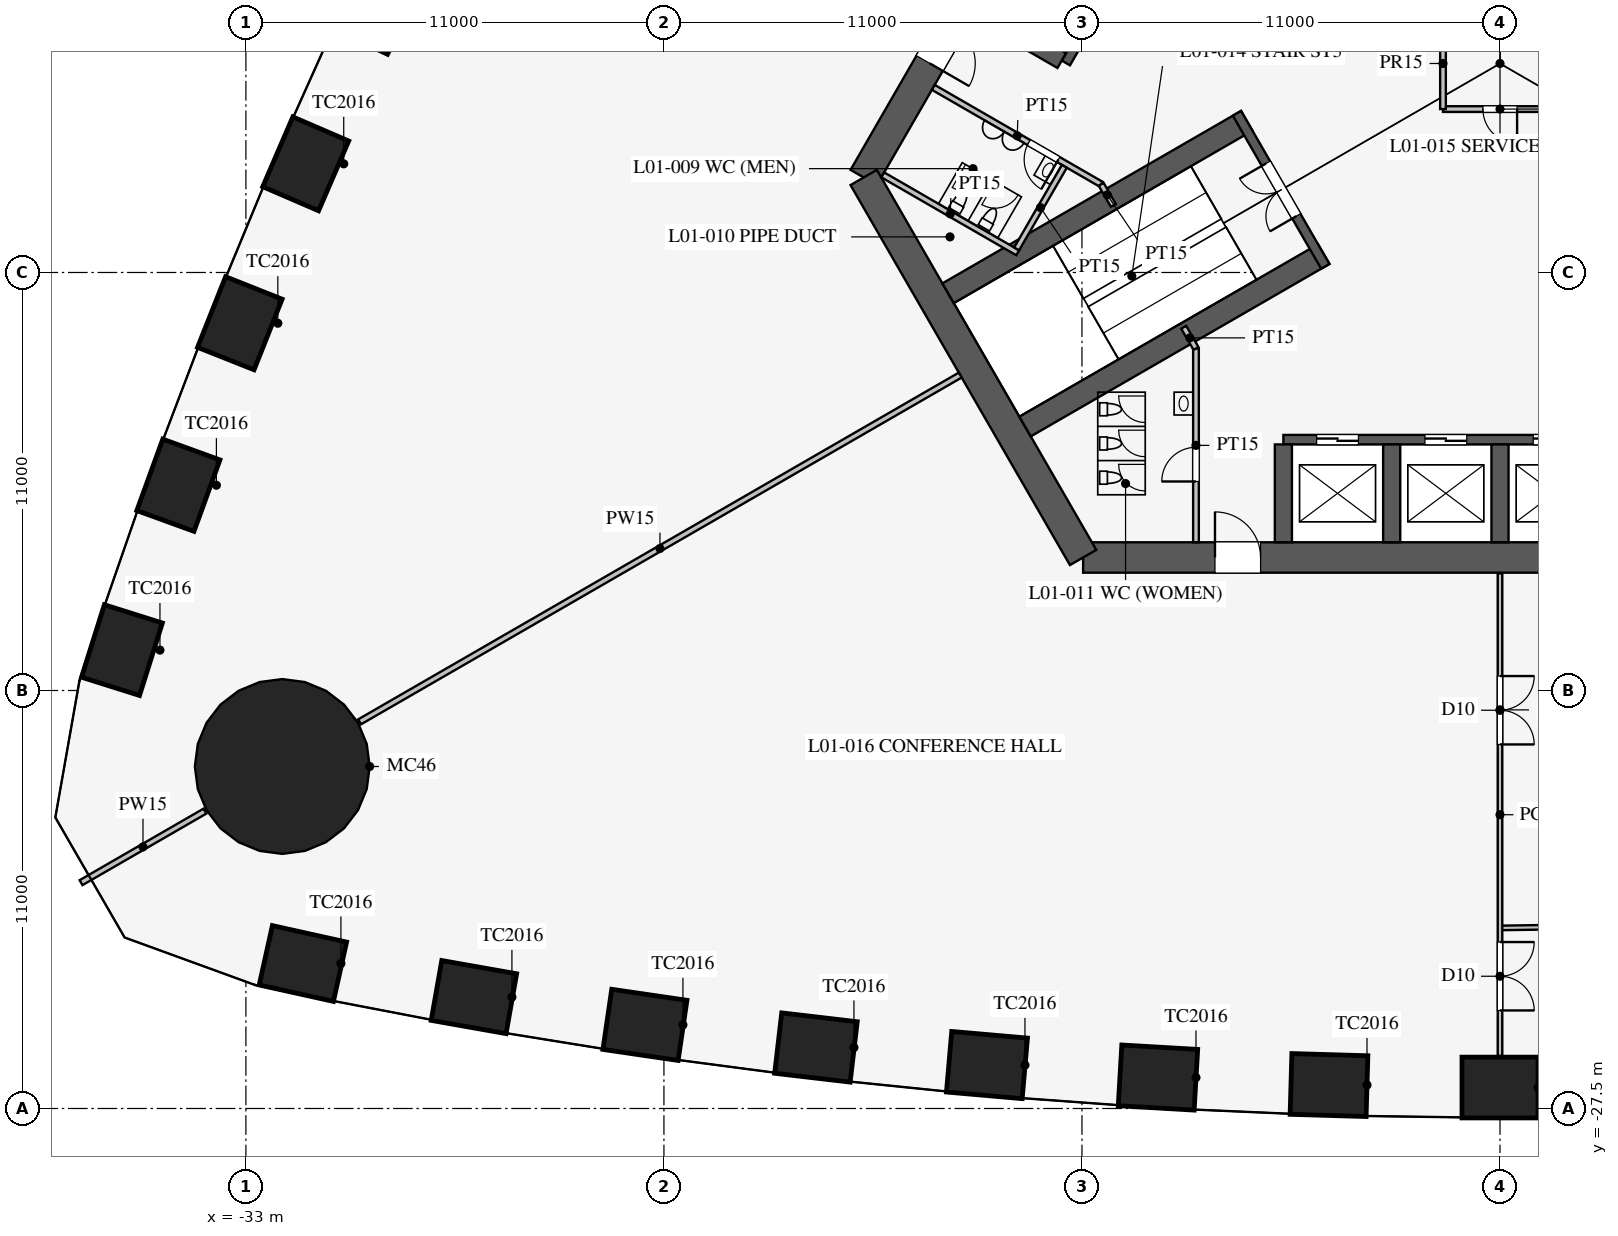
"""IFC4 building model, lengths in metres.
Left out: names, types, materials, properties, quantities, classifications, styles, units other than length and angle.
Written with IfcOpenShell. Run it as: python <this file> out.ifc"""

import sys

from ifc_helpers import new_model, si_unit, direction, frame, frame_2d, origin, origin_2d, place, context, subcontext, project, spatial, rectangle, circle, extrude, element, fill, save


model = new_model("IFC4")
c1 = context("Model", 3, precision=1e-05, world=origin(), true_north=direction((0.0, 1.0)))
c2 = subcontext(c1, "Body", "Model", "MODEL_VIEW")
j1 = project(units=[si_unit("LENGTHUNIT", "METRE"), si_unit("PLANEANGLEUNIT", "RADIAN")], contexts=[c1])
p1 = place(None, origin())
s1 = spatial("IfcSite", under=j1, at=p1, CompositionType="ELEMENT")
p2 = place(p1, origin())
s2 = spatial("IfcBuilding", under=s1, at=p2, CompositionType="ELEMENT")
p3 = place(p2, frame((0.0, 0.0, 6.5)))
s3 = spatial("IfcBuildingStorey", under=s2, at=p3, CompositionType="ELEMENT", Elevation=6.5)
for number, where, z_axis, x_axis in (
    (1, (-31.5, -23.685, 0.0), (0.0, 0.0, 1.0), (0.976, -0.217, 0.0)),
    (2, (-27.0, -24.568, 0.0), (0.0, 0.0, 1.0), (0.985, -0.174, 0.0)),
    (3, (-22.5, -25.299, 0.0), (0.0, 0.0, 1.0), (0.989, -0.145, 0.0)),
    (4, (-18.0, -25.895, 0.0), (0.0, 0.0, 1.0), (0.993, -0.116, 0.0)),
    (5, (-13.5, -26.357, 0.0), (0.0, 0.0, 1.0), (0.996, -0.087, 0.0)),
    (6, (-9.0, -26.686, 0.0), (0.0, 0.0, 1.0), (0.998, -0.058, 0.0)),
    (7, (-4.5, -26.883, 0.0), (0.0, 0.0, 1.0), (1.0, -0.029, 0.0)),
    (8, (0.0, -26.949, 0.0), (0.0, 0.0, 1.0), (1.0, 0.0, 0.0)),
    (9, (-29.576, 1.487, 0.0), (0.0, 0.0, 1.0), (-0.423, -0.906, 0.0)),
    (10, (-31.426, -2.641, 0.0), (0.0, 0.0, 1.0), (-0.396, -0.918, 0.0)),
    (11, (-33.16, -6.836, 0.0), (0.0, 0.0, 1.0), (-0.369, -0.929, 0.0)),
    (12, (-34.776, -11.099, 0.0), (0.0, 0.0, 1.0), (-0.342, -0.94, 0.0)),
    (13, (-36.262, -15.438, 0.0), (0.0, 0.0, 1.0), (-0.3, -0.954, 0.0)),
):
    element("IfcColumn", number, at=place(p3, frame(where, z_axis=z_axis, x_axis=x_axis)), inside=s3, PredefinedType="COLUMN", context=c2, shape_type="SweptSolid", body=[
        extrude(rectangle(XDim=2.0, YDim=1.6, at=origin_2d()), origin(), (0.0, 0.0, 1.0), 5.0),
    ])
p4 = place(p3, frame((-32.043, -18.5, 0.0), z_axis=(0.0, 0.0, 1.0), x_axis=(1.0, 0.0, 0.0)))
e14 = element("IfcColumn", 14, at=p4, inside=s3, PredefinedType="COLUMN", context=c2, shape_type="SweptSolid", body=[
    extrude(circle(Radius=2.3, at=origin_2d()), origin(), (0.0, 0.0, 1.0), 5.0),
])
p5 = place(p3, frame((-10.97, -13.0, 0.0), z_axis=(0.0, 0.0, 1.0), x_axis=(1.0, 0.0, 0.0)))
e15 = element("IfcWall", 15, at=p5, inside=s3, PredefinedType="SHEAR", context=c2, shape_type="SweptSolid", body=[
    extrude(rectangle(XDim=21.939, YDim=0.8, at=frame_2d((10.97, 0.0))), origin(), (0.0, 0.0, 1.0), 5.0),
])
p6 = place(p5, frame((17.27, 0.0, 0.0)))
e16 = element("IfcOpeningElement", 16, at=p6, cuts=e15, PredefinedType="OPENING", context=c2, shape_type="SweptSolid", body=[
    extrude(rectangle(XDim=1.2, YDim=2.1, at=frame_2d((0.6, 1.05))), frame((0.0, 0.41, 0.0), z_axis=(0.0, -1.0, 0.0), x_axis=(1.0, 0.0, 0.0)), (0.0, 0.0, 1.0), 0.82),
])
p7 = place(p5, frame((3.47, 0.0, 0.0)))
e17 = element("IfcOpeningElement", 17, at=p7, cuts=e15, PredefinedType="OPENING", context=c2, shape_type="SweptSolid", body=[
    extrude(rectangle(XDim=1.2, YDim=2.1, at=frame_2d((0.6, 1.05))), frame((0.0, 0.41, 0.0), z_axis=(0.0, -1.0, 0.0), x_axis=(1.0, 0.0, 0.0)), (0.0, 0.0, 1.0), 0.82),
])
p8 = place(p3, frame((-5.773, 16.0, 0.0), z_axis=(0.0, 0.0, 1.0), x_axis=(-0.500002442456, -0.866023993627, 0.0)))
e18 = element("IfcWall", 18, at=p8, inside=s3, PredefinedType="SHEAR", context=c2, shape_type="SweptSolid", body=[
    extrude(rectangle(XDim=21.939, YDim=0.8, at=frame_2d((10.97, 0.0))), origin(), (0.0, 0.0, 1.0), 5.0),
])
p9 = place(p8, frame((17.27, 0.0, 0.0)))
e19 = element("IfcOpeningElement", 19, at=p9, cuts=e18, PredefinedType="OPENING", context=c2, shape_type="SweptSolid", body=[
    extrude(rectangle(XDim=1.2, YDim=2.1, at=frame_2d((0.6, 1.05))), frame((0.0, 0.41, 0.0), z_axis=(0.0, -1.0, 0.0), x_axis=(1.0, 0.0, 0.0)), (0.0, 0.0, 1.0), 0.82),
])
p10 = place(p8, frame((3.47, 0.0, 0.0)))
e20 = element("IfcOpeningElement", 20, at=p10, cuts=e18, PredefinedType="OPENING", context=c2, shape_type="SweptSolid", body=[
    extrude(rectangle(XDim=1.2, YDim=2.1, at=frame_2d((0.6, 1.05))), frame((0.0, 0.41, 0.0), z_axis=(0.0, -1.0, 0.0), x_axis=(1.0, 0.0, 0.0)), (0.0, 0.0, 1.0), 0.82),
])
p11 = place(p3, frame((-16.743, -3.0, 0.0), z_axis=(0.0, 0.0, 1.0), x_axis=(0.499995765644, -0.866027848477, 0.0)))
e21 = element("IfcWall", 21, at=p11, inside=s3, PredefinedType="SHEAR", context=c2, shape_type="SweptSolid", body=[
    extrude(rectangle(XDim=11.547, YDim=0.8, at=frame_2d((5.773, 0.0))), origin(), (0.0, 0.0, 1.0), 5.0),
])
p12 = place(p3, frame((-5.7, -9.9, 0.0), z_axis=(0.0, 0.0, 1.0), x_axis=(1.0, 0.0, 0.0)))
e22 = element("IfcWall", 22, at=p12, inside=s3, PredefinedType="SHEAR", context=c2, shape_type="SweptSolid", body=[
    extrude(rectangle(XDim=11.4, YDim=0.25, at=frame_2d((5.7, 0.0))), origin(), (0.0, 0.0, 1.0), 5.0),
])
p13 = place(p12, frame((0.875, 0.0, 0.0)))
e23 = element("IfcOpeningElement", 23, at=p13, cuts=e22, PredefinedType="OPENING", context=c2, shape_type="SweptSolid", body=[
    extrude(rectangle(XDim=1.1, YDim=2.2, at=frame_2d((0.55, 1.1))), frame((0.0, 0.135, 0.0), z_axis=(0.0, -1.0, 0.0), x_axis=(1.0, 0.0, 0.0)), (0.0, 0.0, 1.0), 0.27),
])
p14 = place(p12, frame((3.725, 0.0, 0.0)))
e24 = element("IfcOpeningElement", 24, at=p14, cuts=e22, PredefinedType="OPENING", context=c2, shape_type="SweptSolid", body=[
    extrude(rectangle(XDim=1.1, YDim=2.2, at=frame_2d((0.55, 1.1))), frame((0.0, 0.135, 0.0), z_axis=(0.0, -1.0, 0.0), x_axis=(1.0, 0.0, 0.0)), (0.0, 0.0, 1.0), 0.27),
])
p15 = place(p12, frame((6.575, 0.0, 0.0)))
e25 = element("IfcOpeningElement", 25, at=p15, cuts=e22, PredefinedType="OPENING", context=c2, shape_type="SweptSolid", body=[
    extrude(rectangle(XDim=1.1, YDim=2.2, at=frame_2d((0.55, 1.1))), frame((0.0, 0.135, 0.0), z_axis=(0.0, -1.0, 0.0), x_axis=(1.0, 0.0, 0.0)), (0.0, 0.0, 1.0), 0.27),
])
p16 = place(p12, frame((9.425, 0.0, 0.0)))
e26 = element("IfcOpeningElement", 26, at=p16, cuts=e22, PredefinedType="OPENING", context=c2, shape_type="SweptSolid", body=[
    extrude(rectangle(XDim=1.1, YDim=2.2, at=frame_2d((0.55, 1.1))), frame((0.0, 0.135, 0.0), z_axis=(0.0, -1.0, 0.0), x_axis=(1.0, 0.0, 0.0)), (0.0, 0.0, 1.0), 0.27),
])
for number, where, z_axis, x_axis in (
    (27, (-5.7, -10.025, 0.0), (0.0, 0.0, 1.0), (0.0, -1.0, 0.0)),
    (28, (-2.85, -10.025, 0.0), (0.0, 0.0, 1.0), (0.0, -1.0, 0.0)),
    (29, (0.0, -10.025, 0.0), (0.0, 0.0, 1.0), (0.0, -1.0, 0.0)),
):
    element("IfcWall", number, at=place(p3, frame(where, z_axis=z_axis, x_axis=x_axis)), inside=s3, PredefinedType="SHEAR", context=c2, shape_type="SweptSolid", body=[
        extrude(rectangle(XDim=2.575, YDim=0.45, at=frame_2d((1.288, 0.0))), origin(), (0.0, 0.0, 1.0), 5.0),
    ])
p17 = place(p3, frame((-5.724, 9.886, 0.0), z_axis=(0.0, 0.0, 1.0), x_axis=(-0.500001763848, -0.866024385424, 0.0)))
e30 = element("IfcWall", 30, at=p17, inside=s3, PredefinedType="SHEAR", context=c2, shape_type="SweptSolid", body=[
    extrude(rectangle(XDim=11.4, YDim=0.25, at=frame_2d((5.7, 0.0))), origin(), (0.0, 0.0, 1.0), 5.0),
])
p18 = place(p17, frame((6.525, 0.0, 0.0)))
e31 = element("IfcOpeningElement", 31, at=p18, cuts=e30, PredefinedType="OPENING", context=c2, shape_type="SweptSolid", body=[
    extrude(rectangle(XDim=1.2, YDim=2.2, at=frame_2d((0.6, 1.1))), frame((0.0, 0.135, 0.0), z_axis=(0.0, -1.0, 0.0), x_axis=(1.0, 0.0, 0.0)), (0.0, 0.0, 1.0), 0.27),
])
p19 = place(p17, frame((9.375, 0.0, 0.0)))
e32 = element("IfcOpeningElement", 32, at=p19, cuts=e30, PredefinedType="OPENING", context=c2, shape_type="SweptSolid", body=[
    extrude(rectangle(XDim=1.2, YDim=2.2, at=frame_2d((0.6, 1.1))), frame((0.0, 0.135, 0.0), z_axis=(0.0, -1.0, 0.0), x_axis=(1.0, 0.0, 0.0)), (0.0, 0.0, 1.0), 0.27),
])
p20 = place(p3, frame((-11.532, 0.076, 0.0), z_axis=(0.0, 0.0, 1.0), x_axis=(-0.866005588531, 0.500034319456, 0.0)))
e33 = element("IfcWall", 33, at=p20, inside=s3, PredefinedType="SHEAR", context=c2, shape_type="SweptSolid", body=[
    extrude(rectangle(XDim=2.575, YDim=0.45, at=frame_2d((1.288, 0.0))), origin(), (0.0, 0.0, 1.0), 5.0),
])
for number, where, z_axis, x_axis in (
    (34, (-6.663, -1.509, 0.0), (0.0, 0.0, 1.0), (-0.866, -0.5, 0.0)),
    (35, (-4.638, -5.016, 0.0), (0.0, 0.0, 1.0), (-0.866, -0.5, 0.0)),
):
    element("IfcWall", number, at=place(p3, frame(where, z_axis=z_axis, x_axis=x_axis)), inside=s3, PredefinedType="SHEAR", context=c2, shape_type="SweptSolid", body=[
        extrude(rectangle(XDim=9.075, YDim=0.6, at=frame_2d((4.538, 0.0))), origin(), (0.0, 0.0, 1.0), 5.0),
    ])
p21 = place(p3, frame((-6.922, -1.312, 0.0), z_axis=(0.0, 0.0, 1.0), x_axis=(0.499984536904, -0.866034331223, 0.0)))
e36 = element("IfcWall", 36, at=p21, inside=s3, PredefinedType="SHEAR", context=c2, shape_type="SweptSolid", body=[
    extrude(rectangle(XDim=4.65, YDim=0.25, at=frame_2d((2.325, 0.0))), origin(), (0.0, 0.0, 1.0), 5.0),
])
p22 = place(p21, frame((1.525, 0.0, 0.0)))
e37 = element("IfcOpeningElement", 37, at=p22, cuts=e36, PredefinedType="OPENING", context=c2, shape_type="SweptSolid", body=[
    extrude(rectangle(XDim=1.6, YDim=2.1, at=frame_2d((0.8, 1.05))), frame((0.0, 0.135, 0.0), z_axis=(0.0, -1.0, 0.0), x_axis=(1.0, 0.0, 0.0)), (0.0, 0.0, 1.0), 0.27),
])
p23 = place(p3, frame((-8.0, -7.5, 0.0), z_axis=(0.0, 0.0, 1.0), x_axis=(0.0, -1.0, 0.0)))
e38 = element("IfcWall", 38, at=p23, inside=s3, PredefinedType="PARTITIONING", context=c2, shape_type="SweptSolid", body=[
    extrude(rectangle(XDim=5.1, YDim=0.15, at=frame_2d((2.55, 0.0))), origin(), (0.0, 0.0, 1.0), 4.8),
])
p24 = place(p23, frame((2.6, 0.0, 0.0)))
e39 = element("IfcOpeningElement", 39, at=p24, cuts=e38, PredefinedType="OPENING", context=c2, shape_type="SweptSolid", body=[
    extrude(rectangle(XDim=0.9, YDim=2.1, at=frame_2d((0.45, 1.05))), frame((0.0, 0.085, 0.0), z_axis=(0.0, -1.0, 0.0), x_axis=(1.0, 0.0, 0.0)), (0.0, 0.0, 1.0), 0.17),
])
p25 = place(p3, frame((-10.495, -3.178, 0.0), z_axis=(0.0, 0.0, 1.0), x_axis=(-0.86602216432, 0.500005610874, 0.0)))
e40 = element("IfcWall", 40, at=p25, inside=s3, PredefinedType="PARTITIONING", context=c2, shape_type="SweptSolid", body=[
    extrude(rectangle(XDim=5.1, YDim=0.15, at=frame_2d((2.55, 0.0))), origin(), (0.0, 0.0, 1.0), 4.8),
])
p26 = place(p25, frame((1.3, 0.0, 0.0)))
e41 = element("IfcOpeningElement", 41, at=p26, cuts=e40, PredefinedType="OPENING", context=c2, shape_type="SweptSolid", body=[
    extrude(rectangle(XDim=0.9, YDim=2.1, at=frame_2d((0.45, 1.05))), frame((0.0, 0.085, 0.0), z_axis=(0.0, -1.0, 0.0), x_axis=(1.0, 0.0, 0.0)), (0.0, 0.0, 1.0), 0.17),
])
for number, where, z_axis, x_axis in (
    (42, (-10.495, -3.178, 0.0), (0.0, 0.0, 1.0), (0.5, -0.866, 0.0)),
    (43, (-8.0, -7.5, 0.0), (0.0, 0.0, 1.0), (-0.5, 0.866, 0.0)),
):
    element("IfcWall", number, at=place(p3, frame(where, z_axis=z_axis, x_axis=x_axis)), inside=s3, PredefinedType="PARTITIONING", context=c2, shape_type="SweptSolid", body=[
        extrude(rectangle(XDim=0.645, YDim=0.15, at=frame_2d((0.323, 0.0))), origin(), (0.0, 0.0, 1.0), 4.8),
    ])
p27 = place(p3, frame((-12.691, -4.982, 0.0), z_axis=(0.0, 0.0, 1.0), x_axis=(-0.8660249478, 0.500000789788, 0.0)))
e44 = element("IfcWall", 44, at=p27, inside=s3, PredefinedType="PARTITIONING", context=c2, shape_type="SweptSolid", body=[
    extrude(rectangle(XDim=4.1, YDim=0.15, at=frame_2d((2.05, 0.0))), origin(), (0.0, 0.0, 1.0), 4.8),
])
p28 = place(p3, frame((-11.464, -2.706, 0.0), z_axis=(0.0, 0.0, 1.0), x_axis=(-0.50001992892, -0.866013897511, 0.0)))
e45 = element("IfcWall", 45, at=p28, inside=s3, PredefinedType="PARTITIONING", context=c2, shape_type="SweptSolid", body=[
    extrude(rectangle(XDim=2.51, YDim=0.15, at=frame_2d((1.255, 0.0))), origin(), (0.0, 0.0, 1.0), 4.8),
])
p29 = place(p3, frame((-1.5, -1.2, 0.0), z_axis=(0.0, 0.0, 1.0), x_axis=(1.0, 0.0, 0.0)))
e46 = element("IfcWall", 46, at=p29, inside=s3, PredefinedType="PARTITIONING", context=c2, shape_type="SweptSolid", body=[
    extrude(rectangle(XDim=3.0, YDim=0.15, at=frame_2d((1.5, 0.0))), origin(), (0.0, 0.0, 1.0), 4.8),
])
p30 = place(p29, frame((1.05, 0.0, 0.0)))
e47 = element("IfcOpeningElement", 47, at=p30, cuts=e46, PredefinedType="OPENING", context=c2, shape_type="SweptSolid", body=[
    extrude(rectangle(XDim=0.9, YDim=2.1, at=frame_2d((0.45, 1.05))), frame((0.0, 0.085, 0.0), z_axis=(0.0, -1.0, 0.0), x_axis=(1.0, 0.0, 0.0)), (0.0, 0.0, 1.0), 0.17),
])
p31 = place(p3, frame((-1.5, 1.2, 0.0), z_axis=(0.0, 0.0, 1.0), x_axis=(0.0, -1.0, 0.0)))
e48 = element("IfcWall", 48, at=p31, inside=s3, PredefinedType="PARTITIONING", context=c2, shape_type="SweptSolid", body=[
    extrude(rectangle(XDim=2.4, YDim=0.15, at=frame_2d((1.2, 0.0))), origin(), (0.0, 0.0, 1.0), 4.8),
])
p32 = place(p3, frame((-14.203, -8.2, 0.0), z_axis=(0.0, 0.0, 1.0), x_axis=(-0.866024965723, -0.500000758745, 0.0)))
e49 = element("IfcWall", 49, at=p32, inside=s3, PredefinedType="PARTITIONING", context=c2, shape_type="SweptSolid", body=[
    extrude(rectangle(XDim=18.25, YDim=0.15, at=frame_2d((9.125, 0.0))), origin(), (0.0, 0.0, 1.0), 3.1),
])
p33 = place(p3, frame((-34.078, -19.675, 0.0), z_axis=(0.0, 0.0, 1.0), x_axis=(-0.866019247219, -0.500010663332, 0.0)))
e50 = element("IfcWall", 50, at=p33, inside=s3, PredefinedType="PARTITIONING", context=c2, shape_type="SweptSolid", body=[
    extrude(rectangle(XDim=3.764, YDim=0.15, at=frame_2d((1.882, 0.0))), origin(), (0.0, 0.0, 1.0), 3.1),
])
p34 = place(p3, frame((0.0, -22.749, 0.0), z_axis=(0.0, 0.0, 1.0), x_axis=(0.999894311967, 0.014538393859, 0.0)))
e51 = element("IfcWall", 51, at=p34, inside=s3, PredefinedType="PARTITIONING", context=c2, shape_type="SweptSolid", body=[
    extrude(rectangle(XDim=4.5, YDim=0.12, at=frame_2d((2.25, 0.0))), origin(), (0.0, 0.0, 1.0), 3.6),
])
p35 = place(p34, frame((1.8, 0.0, 0.0)))
e52 = element("IfcOpeningElement", 52, at=p35, cuts=e51, PredefinedType="OPENING", context=c2, shape_type="SweptSolid", body=[
    extrude(rectangle(XDim=0.9, YDim=2.1, at=frame_2d((0.45, 1.05))), frame((0.0, 0.07, 0.0), z_axis=(0.0, -1.0, 0.0), x_axis=(1.0, 0.0, 0.0)), (0.0, 0.0, 1.0), 0.14),
])
p36 = place(p3, frame((0.0, -13.42, 0.0), z_axis=(0.0, 0.0, 1.0), x_axis=(0.0, -1.0, 0.0)))
e53 = element("IfcWall", 53, at=p36, inside=s3, PredefinedType="PARTITIONING", context=c2, shape_type="SweptSolid", body=[
    extrude(rectangle(XDim=12.699, YDim=0.12, at=frame_2d((6.349, 0.0))), origin(), (0.0, 0.0, 1.0), 3.6),
])
p37 = place(p36, frame((2.7, 0.0, 0.0)))
e54 = element("IfcOpeningElement", 54, at=p37, cuts=e53, PredefinedType="OPENING", context=c2, shape_type="SweptSolid", body=[
    extrude(rectangle(XDim=1.8, YDim=2.1, at=frame_2d((0.9, 1.05))), frame((0.0, 0.07, 0.0), z_axis=(0.0, -1.0, 0.0), x_axis=(1.0, 0.0, 0.0)), (0.0, 0.0, 1.0), 0.14),
])
p38 = place(p36, frame((9.7, 0.0, 0.0)))
e55 = element("IfcOpeningElement", 55, at=p38, cuts=e53, PredefinedType="OPENING", context=c2, shape_type="SweptSolid", body=[
    extrude(rectangle(XDim=1.8, YDim=2.1, at=frame_2d((0.9, 1.05))), frame((0.0, 0.07, 0.0), z_axis=(0.0, -1.0, 0.0), x_axis=(1.0, 0.0, 0.0)), (0.0, 0.0, 1.0), 0.14),
])
p39 = place(p24, frame((0.9, 0.0, 0.0), z_axis=(0.0, 0.0, 1.0), x_axis=(-1.0, 0.0, 0.0)))
e56 = element("IfcDoor", 56, at=p39, inside=s3, OperationType="SINGLE_SWING_LEFT", PredefinedType="DOOR", context=c2, shape_type="SweptSolid", body=[
    extrude(rectangle(XDim=0.9, YDim=2.1, at=frame_2d((0.45, 1.05))), frame((0.0, 0.025, 0.0), z_axis=(0.0, -1.0, 0.0), x_axis=(1.0, 0.0, 0.0)), (0.0, 0.0, 1.0), 0.05),
])
fill(e39, e56)
p40 = place(p26, origin())
e57 = element("IfcDoor", 57, at=p40, inside=s3, OperationType="SINGLE_SWING_LEFT", PredefinedType="DOOR", context=c2, shape_type="SweptSolid", body=[
    extrude(rectangle(XDim=0.9, YDim=2.1, at=frame_2d((0.45, 1.05))), frame((0.0, 0.025, 0.0), z_axis=(0.0, -1.0, 0.0), x_axis=(1.0, 0.0, 0.0)), (0.0, 0.0, 1.0), 0.05),
])
fill(e41, e57)
p41 = place(p30, frame((0.9, 0.0, 0.0), z_axis=(0.0, 0.0, 1.0), x_axis=(-1.0, 0.0, 0.0)))
e58 = element("IfcDoor", 58, at=p41, inside=s3, OperationType="SINGLE_SWING_LEFT", PredefinedType="DOOR", context=c2, shape_type="SweptSolid", body=[
    extrude(rectangle(XDim=0.9, YDim=2.1, at=frame_2d((0.45, 1.05))), frame((0.0, 0.025, 0.0), z_axis=(0.0, -1.0, 0.0), x_axis=(1.0, 0.0, 0.0)), (0.0, 0.0, 1.0), 0.05),
])
fill(e47, e58)
p42 = place(p22, frame((1.6, 0.0, 0.0), z_axis=(0.0, 0.0, 1.0), x_axis=(-1.0, 0.0, 0.0)))
e59 = element("IfcDoor", 59, at=p42, inside=s3, OperationType="DOUBLE_DOOR_SINGLE_SWING", PredefinedType="DOOR", context=c2, shape_type="SweptSolid", body=[
    extrude(rectangle(XDim=1.6, YDim=2.1, at=frame_2d((0.8, 1.05))), frame((0.0, 0.025, 0.0), z_axis=(0.0, -1.0, 0.0), x_axis=(1.0, 0.0, 0.0)), (0.0, 0.0, 1.0), 0.05),
])
fill(e37, e59)
p43 = place(p7, origin())
e60 = element("IfcDoor", 60, at=p43, inside=s3, OperationType="SINGLE_SWING_LEFT", PredefinedType="DOOR", context=c2, shape_type="SweptSolid", body=[
    extrude(rectangle(XDim=1.2, YDim=2.1, at=frame_2d((0.6, 1.05))), frame((0.0, 0.025, 0.0), z_axis=(0.0, -1.0, 0.0), x_axis=(1.0, 0.0, 0.0)), (0.0, 0.0, 1.0), 0.05),
])
fill(e17, e60)
p44 = place(p9, origin())
e61 = element("IfcDoor", 61, at=p44, inside=s3, OperationType="SINGLE_SWING_RIGHT", PredefinedType="DOOR", context=c2, shape_type="SweptSolid", body=[
    extrude(rectangle(XDim=1.2, YDim=2.1, at=frame_2d((0.6, 1.05))), frame((0.0, 0.025, 0.0), z_axis=(0.0, -1.0, 0.0), x_axis=(1.0, 0.0, 0.0)), (0.0, 0.0, 1.0), 0.05),
])
fill(e19, e61)
p45 = place(p37, origin())
e62 = element("IfcDoor", 62, at=p45, inside=s3, OperationType="DOUBLE_DOOR_SINGLE_SWING", PredefinedType="DOOR", context=c2, shape_type="SweptSolid", body=[
    extrude(rectangle(XDim=1.8, YDim=2.1, at=frame_2d((0.9, 1.05))), frame((0.0, 0.025, 0.0), z_axis=(0.0, -1.0, 0.0), x_axis=(1.0, 0.0, 0.0)), (0.0, 0.0, 1.0), 0.05),
])
fill(e54, e62)
p46 = place(p38, origin())
e63 = element("IfcDoor", 63, at=p46, inside=s3, OperationType="DOUBLE_DOOR_SINGLE_SWING", PredefinedType="DOOR", context=c2, shape_type="SweptSolid", body=[
    extrude(rectangle(XDim=1.8, YDim=2.1, at=frame_2d((0.9, 1.05))), frame((0.0, 0.025, 0.0), z_axis=(0.0, -1.0, 0.0), x_axis=(1.0, 0.0, 0.0)), (0.0, 0.0, 1.0), 0.05),
])
fill(e55, e63)
p47 = place(p13, origin())
e64 = element("IfcDoor", 64, at=p47, inside=s3, OperationType="DOUBLE_DOOR_SLIDING", PredefinedType="DOOR", context=c2, shape_type="SweptSolid", body=[
    extrude(rectangle(XDim=1.1, YDim=2.2, at=frame_2d((0.55, 1.1))), frame((0.0, 0.025, 0.0), z_axis=(0.0, -1.0, 0.0), x_axis=(1.0, 0.0, 0.0)), (0.0, 0.0, 1.0), 0.05),
])
fill(e23, e64)
p48 = place(p14, origin())
e65 = element("IfcDoor", 65, at=p48, inside=s3, OperationType="DOUBLE_DOOR_SLIDING", PredefinedType="DOOR", context=c2, shape_type="SweptSolid", body=[
    extrude(rectangle(XDim=1.1, YDim=2.2, at=frame_2d((0.55, 1.1))), frame((0.0, 0.025, 0.0), z_axis=(0.0, -1.0, 0.0), x_axis=(1.0, 0.0, 0.0)), (0.0, 0.0, 1.0), 0.05),
])
fill(e24, e65)
p49 = place(p15, origin())
e66 = element("IfcDoor", 66, at=p49, inside=s3, OperationType="DOUBLE_DOOR_SLIDING", PredefinedType="DOOR", context=c2, shape_type="SweptSolid", body=[
    extrude(rectangle(XDim=1.1, YDim=2.2, at=frame_2d((0.55, 1.1))), frame((0.0, 0.025, 0.0), z_axis=(0.0, -1.0, 0.0), x_axis=(1.0, 0.0, 0.0)), (0.0, 0.0, 1.0), 0.05),
])
fill(e25, e66)
save(model, sys.argv[1])
